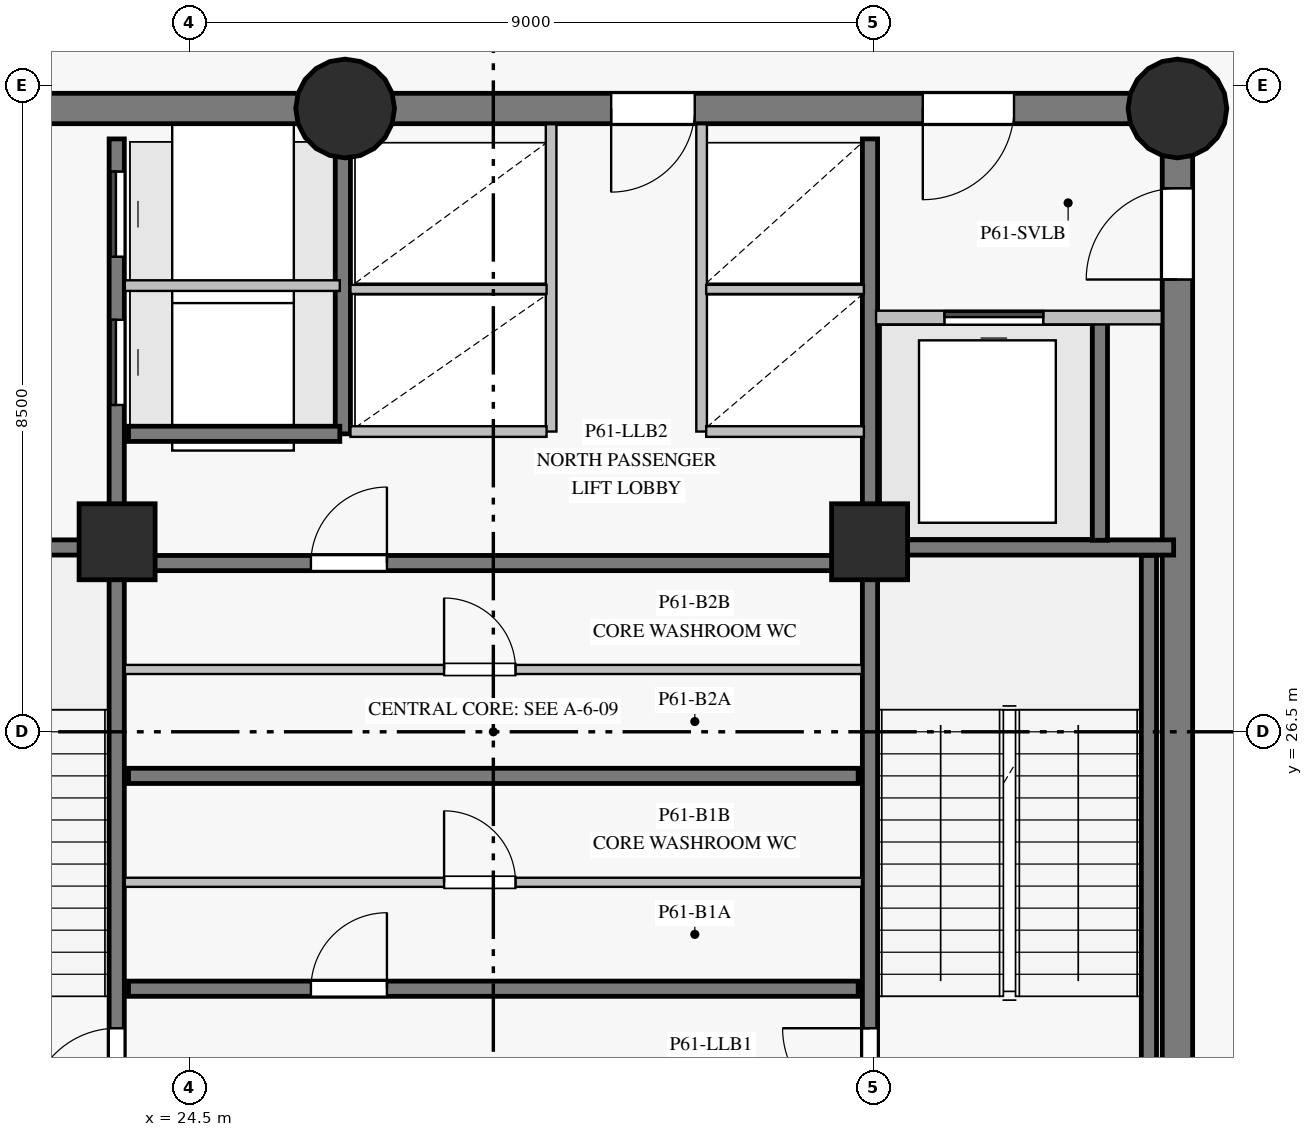
"""IFC4 building model, lengths in metres.
Left out: names, types, materials, properties, quantities, classifications, styles, units other than length and angle.
Written with IfcOpenShell. Run it as: python <this file> out.ifc"""

import sys

from ifc_helpers import new_model, si_unit, direction, frame, frame_2d, origin, origin_with_axes, origin_2d, place, context, subcontext, project, spatial, rectangle, circle, extrude, source, transform, mapped, element, fill, save


model = new_model("IFC4")
c1 = context("Model", 3, precision=1e-05, world=origin(), true_north=direction((0.0, 1.0)))
c2 = subcontext(c1, "Body", "Model", "MODEL_VIEW")
j1 = project(units=[si_unit("LENGTHUNIT", "METRE"), si_unit("PLANEANGLEUNIT", "RADIAN")], contexts=[c1])
p1 = place(None, origin())
s1 = spatial("IfcSite", under=j1, at=p1, CompositionType="ELEMENT")
p2 = place(p1, origin())
s2 = spatial("IfcBuilding", under=s1, at=p2, CompositionType="ELEMENT")
p3 = place(p2, frame((0.0, 0.0, 208.4)))
s3 = spatial("IfcBuildingStorey", under=s2, at=p3, CompositionType="ELEMENT", Elevation=208.4)
p4 = place(p3, frame((37.5, 18.3, 0.0), z_axis=(0.0, 0.0, 1.0), x_axis=(0.0, 1.0, 0.0)))
e1 = element("IfcWall", 1, at=p4, inside=s3, PredefinedType="SHEAR", context=c2, shape_type="SweptSolid", body=[
    extrude(rectangle(XDim=16.4, YDim=0.4, at=frame_2d((8.2, 0.0))), origin(), (0.0, 0.0, 1.0), 4.3),
])
p5 = place(p4, frame((14.15, 0.0, 0.0)))
e2 = element("IfcOpeningElement", 2, at=p5, cuts=e1, PredefinedType="OPENING", context=c2, shape_type="SweptSolid", body=[
    extrude(rectangle(XDim=1.2, YDim=2.15, at=frame_2d((0.6, 1.075))), frame((0.0, 0.21, 0.0), z_axis=(0.0, -1.0, 0.0), x_axis=(1.0, 0.0, 0.0)), (0.0, 0.0, 1.0), 0.42),
])
p6 = place(p3, frame((37.5, 34.7, 0.0), z_axis=(0.0, 0.0, 1.0), x_axis=(-1.0, 0.0, 0.0)))
e3 = element("IfcWall", 3, at=p6, inside=s3, PredefinedType="SHEAR", context=c2, shape_type="SweptSolid", body=[
    extrude(rectangle(XDim=10.95, YDim=0.4, at=frame_2d((5.475, 0.0))), origin(), (0.0, 0.0, 1.0), 4.3),
])
p7 = place(p6, frame((2.15, 0.0, 0.0)))
e4 = element("IfcOpeningElement", 4, at=p7, cuts=e3, PredefinedType="OPENING", context=c2, shape_type="SweptSolid", body=[
    extrude(rectangle(XDim=1.2, YDim=2.15, at=frame_2d((0.6, 1.075))), frame((0.0, 0.21, 0.0), z_axis=(0.0, -1.0, 0.0), x_axis=(1.0, 0.0, 0.0)), (0.0, 0.0, 1.0), 0.42),
])
p8 = place(p6, frame((6.35, 0.0, 0.0)))
e5 = element("IfcOpeningElement", 5, at=p8, cuts=e3, PredefinedType="OPENING", context=c2, shape_type="SweptSolid", body=[
    extrude(rectangle(XDim=1.1, YDim=2.15, at=frame_2d((0.55, 1.075))), frame((0.0, 0.21, 0.0), z_axis=(0.0, -1.0, 0.0), x_axis=(1.0, 0.0, 0.0)), (0.0, 0.0, 1.0), 0.42),
])
p9 = place(p3, frame((26.55, 34.7, 0.0), z_axis=(0.0, 0.0, 1.0), x_axis=(-1.0, 0.0, 0.0)))
e6 = element("IfcWall", 6, at=p9, inside=s3, PredefinedType="SHEAR", context=c2, shape_type="SweptSolid", body=[
    extrude(rectangle(XDim=7.05, YDim=0.4, at=frame_2d((3.525, 0.0))), origin(), (0.0, 0.0, 1.0), 4.3),
])
p10 = place(p9, frame((4.25, 0.0, 0.0)))
e7 = element("IfcOpeningElement", 7, at=p10, cuts=e6, PredefinedType="OPENING", context=c2, shape_type="SweptSolid", body=[
    extrude(rectangle(XDim=1.1, YDim=2.15, at=frame_2d((0.55, 1.075))), frame((0.0, 0.21, 0.0), z_axis=(0.0, -1.0, 0.0), x_axis=(1.0, 0.0, 0.0)), (0.0, 0.0, 1.0), 0.42),
])
m1 = source(origin_with_axes(), c2, "Body", "SweptSolid", [
    extrude(circle(Radius=0.65, at=origin_2d()), origin(), (0.0, 0.0, 1.0), 4.5),
])
for number, where, z_axis, x_axis in (
    (8, (26.55, 34.7, 0.0), (0.0, 0.0, 1.0), (1.0, 0.0, 0.0)),
    (9, (37.5, 34.7, 0.0), (0.0, 0.0, 1.0), (1.0, 0.0, 0.0)),
):
    element("IfcColumn", number, at=place(p3, frame(where, z_axis=z_axis, x_axis=x_axis)), inside=s3, PredefinedType="COLUMN", context=c2, shape_type="MappedRepresentation", body=[
        mapped(m1, transform((0.0, 0.0, 0.0), scale=1.0)),
    ])
m2 = source(origin_with_axes(), c2, "Body", "SweptSolid", [
    extrude(rectangle(XDim=1.0, YDim=1.0, at=origin_2d()), origin(), (0.0, 0.0, 1.0), 4.5),
])
for number, where, z_axis, x_axis in (
    (10, (23.55, 29.0, 0.0), (0.0, 0.0, 1.0), (1.0, 0.0, 0.0)),
    (11, (33.45, 29.0, 0.0), (0.0, 0.0, 1.0), (1.0, 0.0, 0.0)),
):
    element("IfcColumn", number, at=place(p3, frame(where, z_axis=z_axis, x_axis=x_axis)), inside=s3, PredefinedType="COLUMN", context=c2, shape_type="MappedRepresentation", body=[
        mapped(m2, transform((0.0, 0.0, 0.0), scale=1.0)),
    ])
p11 = place(p3, frame((23.545, 18.7, 0.0), z_axis=(0.0, 0.0, 1.0), x_axis=(0.0, 1.0, 0.0)))
e12 = element("IfcWall", 12, at=p11, inside=s3, PredefinedType="SHEAR", context=c2, shape_type="SweptSolid", body=[
    extrude(rectangle(XDim=15.6, YDim=0.2, at=frame_2d((7.8, 0.0))), origin(), (0.0, 0.0, 1.0), 4.3),
])
p12 = place(p11, frame((2.75, 0.0, 0.0)))
e13 = element("IfcOpeningElement", 13, at=p12, cuts=e12, PredefinedType="OPENING", context=c2, shape_type="SweptSolid", body=[
    extrude(rectangle(XDim=1.15, YDim=2.15, at=frame_2d((0.575, 1.075))), frame((0.0, 0.11, 0.0), z_axis=(0.0, -1.0, 0.0), x_axis=(1.0, 0.0, 0.0)), (0.0, 0.0, 1.0), 0.22),
])
p13 = place(p11, frame((0.14, 0.0, 0.0)))
e14 = element("IfcOpeningElement", 14, at=p13, cuts=e12, PredefinedType="OPENING", context=c2, shape_type="SweptSolid", body=[
    extrude(rectangle(XDim=0.88, YDim=2.1, at=frame_2d((0.44, 1.05))), frame((0.0, 0.11, 0.0), z_axis=(0.0, -1.0, 0.0), x_axis=(1.0, 0.0, 0.0)), (0.0, 0.0, 1.0), 0.22),
])
p14 = place(p11, frame((1.36, 0.0, 0.0)))
e15 = element("IfcOpeningElement", 15, at=p14, cuts=e12, PredefinedType="OPENING", context=c2, shape_type="SweptSolid", body=[
    extrude(rectangle(XDim=0.88, YDim=2.1, at=frame_2d((0.44, 1.05))), frame((0.0, 0.11, 0.0), z_axis=(0.0, -1.0, 0.0), x_axis=(1.0, 0.0, 0.0)), (0.0, 0.0, 1.0), 0.22),
])
p15 = place(p11, frame((12.1, 0.0, 0.0)))
e16 = element("IfcOpeningElement", 16, at=p15, cuts=e12, PredefinedType="OPENING", context=c2, shape_type="SweptSolid", body=[
    extrude(rectangle(XDim=1.12, YDim=2.15, at=frame_2d((0.56, 1.075))), frame((0.0, 0.11, 0.0), z_axis=(0.0, -1.0, 0.0), x_axis=(1.0, 0.0, 0.0)), (0.0, 0.0, 1.0), 0.22),
])
p16 = place(p11, frame((14.05, 0.0, 0.0)))
e17 = element("IfcOpeningElement", 17, at=p16, cuts=e12, PredefinedType="OPENING", context=c2, shape_type="SweptSolid", body=[
    extrude(rectangle(XDim=1.12, YDim=2.15, at=frame_2d((0.56, 1.075))), frame((0.0, 0.11, 0.0), z_axis=(0.0, -1.0, 0.0), x_axis=(1.0, 0.0, 0.0)), (0.0, 0.0, 1.0), 0.22),
])
p17 = place(p3, frame((33.455, 18.7, 0.0), z_axis=(0.0, 0.0, 1.0), x_axis=(0.0, 1.0, 0.0)))
e18 = element("IfcWall", 18, at=p17, inside=s3, PredefinedType="SHEAR", context=c2, shape_type="SweptSolid", body=[
    extrude(rectangle(XDim=15.6, YDim=0.2, at=frame_2d((7.8, 0.0))), origin(), (0.0, 0.0, 1.0), 4.3),
])
p18 = place(p17, frame((2.75, 0.0, 0.0)))
e19 = element("IfcOpeningElement", 19, at=p18, cuts=e18, PredefinedType="OPENING", context=c2, shape_type="SweptSolid", body=[
    extrude(rectangle(XDim=1.15, YDim=2.15, at=frame_2d((0.575, 1.075))), frame((0.0, 0.11, 0.0), z_axis=(0.0, -1.0, 0.0), x_axis=(1.0, 0.0, 0.0)), (0.0, 0.0, 1.0), 0.22),
])
p19 = place(p17, frame((0.55, 0.0, 0.0)))
e20 = element("IfcOpeningElement", 20, at=p19, cuts=e18, PredefinedType="OPENING", context=c2, shape_type="SweptSolid", body=[
    extrude(rectangle(XDim=0.94, YDim=2.1, at=frame_2d((0.47, 1.05))), frame((0.0, 0.11, 0.0), z_axis=(0.0, -1.0, 0.0), x_axis=(1.0, 0.0, 0.0)), (0.0, 0.0, 1.0), 0.22),
])
p20 = place(p3, frame((23.7, 23.12, 0.0), z_axis=(0.0, 0.0, 1.0), x_axis=(1.0, 0.0, 0.0)))
e21 = element("IfcWall", 21, at=p20, inside=s3, PredefinedType="SHEAR", context=c2, shape_type="SweptSolid", body=[
    extrude(rectangle(XDim=9.6, YDim=0.2, at=frame_2d((4.8, 0.0))), origin(), (0.0, 0.0, 1.0), 4.3),
])
p21 = place(p20, frame((2.4, 0.0, 0.0)))
e22 = element("IfcOpeningElement", 22, at=p21, cuts=e21, PredefinedType="OPENING", context=c2, shape_type="SweptSolid", body=[
    extrude(rectangle(XDim=1.0, YDim=2.15, at=frame_2d((0.5, 1.075))), frame((0.0, 0.11, 0.0), z_axis=(0.0, -1.0, 0.0), x_axis=(1.0, 0.0, 0.0)), (0.0, 0.0, 1.0), 0.22),
])
p22 = place(p3, frame((23.7, 25.92, 0.0), z_axis=(0.0, 0.0, 1.0), x_axis=(1.0, 0.0, 0.0)))
e23 = element("IfcWall", 23, at=p22, inside=s3, PredefinedType="SHEAR", context=c2, shape_type="SweptSolid", body=[
    extrude(rectangle(XDim=9.6, YDim=0.2, at=frame_2d((4.8, 0.0))), origin(), (0.0, 0.0, 1.0), 4.3),
])
p23 = place(p3, frame((23.7, 28.72, 0.0), z_axis=(0.0, 0.0, 1.0), x_axis=(1.0, 0.0, 0.0)))
e24 = element("IfcWall", 24, at=p23, inside=s3, PredefinedType="SHEAR", context=c2, shape_type="SweptSolid", body=[
    extrude(rectangle(XDim=9.6, YDim=0.2, at=frame_2d((4.8, 0.0))), origin(), (0.0, 0.0, 1.0), 4.3),
])
p24 = place(p23, frame((2.4, 0.0, 0.0)))
e25 = element("IfcOpeningElement", 25, at=p24, cuts=e24, PredefinedType="OPENING", context=c2, shape_type="SweptSolid", body=[
    extrude(rectangle(XDim=1.0, YDim=2.15, at=frame_2d((0.5, 1.075))), frame((0.0, 0.11, 0.0), z_axis=(0.0, -1.0, 0.0), x_axis=(1.0, 0.0, 0.0)), (0.0, 0.0, 1.0), 0.22),
])
p25 = place(p3, frame((37.125, 21.32, 0.0), z_axis=(0.0, 0.0, 1.0), x_axis=(0.0, 1.0, 0.0)))
e26 = element("IfcWall", 26, at=p25, inside=s3, PredefinedType="SHEAR", context=c2, shape_type="SweptSolid", body=[
    extrude(rectangle(XDim=7.5, YDim=0.2, at=frame_2d((3.75, 0.0))), origin(), (0.0, 0.0, 1.0), 4.3),
])
for number, where, z_axis, x_axis in (
    (27, (33.455, 28.925, 0.0), (0.0, 0.0, 1.0), (1.0, 0.0, 0.0)),
    (28, (19.55, 28.925, 0.0), (0.0, 0.0, 1.0), (1.0, 0.0, 0.0)),
):
    element("IfcWall", number, at=place(p3, frame(where, z_axis=z_axis, x_axis=x_axis)), inside=s3, PredefinedType="SHEAR", context=c2, shape_type="SweptSolid", body=[
        extrude(rectangle(XDim=3.995, YDim=0.2, at=frame_2d((1.998, 0.0))), origin(), (0.0, 0.0, 1.0), 4.3),
    ])
p26 = place(p3, frame((26.52, 30.42, 0.0), z_axis=(0.0, 0.0, 1.0), x_axis=(0.0, 1.0, 0.0)))
e29 = element("IfcWall", 29, at=p26, inside=s3, PredefinedType="SHEAR", context=c2, shape_type="SweptSolid", body=[
    extrude(rectangle(XDim=3.86, YDim=0.2, at=frame_2d((1.93, 0.0))), origin(), (0.0, 0.0, 1.0), 4.3),
])
p27 = place(p3, frame((36.48, 29.02, 0.0), z_axis=(0.0, 0.0, 1.0), x_axis=(0.0, 1.0, 0.0)))
e30 = element("IfcWall", 30, at=p27, inside=s3, PredefinedType="SHEAR", context=c2, shape_type="SweptSolid", body=[
    extrude(rectangle(XDim=2.86, YDim=0.2, at=frame_2d((1.43, 0.0))), origin(), (0.0, 0.0, 1.0), 4.3),
])
p28 = place(p3, frame((23.7, 30.42, 0.0), z_axis=(0.0, 0.0, 1.0), x_axis=(1.0, 0.0, 0.0)))
e31 = element("IfcWall", 31, at=p28, inside=s3, PredefinedType="SHEAR", context=c2, shape_type="SweptSolid", body=[
    extrude(rectangle(XDim=2.78, YDim=0.2, at=frame_2d((1.39, 0.0))), origin(), (0.0, 0.0, 1.0), 4.3),
])
p29 = place(p3, frame((23.652, 24.52, 0.0), z_axis=(0.0, 0.0, 1.0), x_axis=(1.0, 0.0, 0.0)))
e32 = element("IfcWall", 32, at=p29, inside=s3, PredefinedType="PARTITIONING", context=c2, shape_type="SweptSolid", body=[
    extrude(rectangle(XDim=9.698, YDim=0.12, at=frame_2d((4.849, 0.0))), origin(), (0.0, 0.0, 1.0), 4.3),
])
p30 = place(p29, frame((4.2, 0.0, 0.0)))
e33 = element("IfcOpeningElement", 33, at=p30, cuts=e32, PredefinedType="OPENING", context=c2, shape_type="SweptSolid", body=[
    extrude(rectangle(XDim=0.94, YDim=2.1, at=frame_2d((0.47, 1.05))), frame((0.0, 0.07, 0.0), z_axis=(0.0, -1.0, 0.0), x_axis=(1.0, 0.0, 0.0)), (0.0, 0.0, 1.0), 0.14),
])
p31 = place(p3, frame((23.652, 27.32, 0.0), z_axis=(0.0, 0.0, 1.0), x_axis=(1.0, 0.0, 0.0)))
e34 = element("IfcWall", 34, at=p31, inside=s3, PredefinedType="PARTITIONING", context=c2, shape_type="SweptSolid", body=[
    extrude(rectangle(XDim=9.698, YDim=0.12, at=frame_2d((4.849, 0.0))), origin(), (0.0, 0.0, 1.0), 4.3),
])
p32 = place(p31, frame((4.2, 0.0, 0.0)))
e35 = element("IfcOpeningElement", 35, at=p32, cuts=e34, PredefinedType="OPENING", context=c2, shape_type="SweptSolid", body=[
    extrude(rectangle(XDim=0.94, YDim=2.1, at=frame_2d((0.47, 1.05))), frame((0.0, 0.07, 0.0), z_axis=(0.0, -1.0, 0.0), x_axis=(1.0, 0.0, 0.0)), (0.0, 0.0, 1.0), 0.14),
])
for number, where, z_axis, x_axis in (
    (36, (29.26, 30.45, 0.0), (0.0, 0.0, 1.0), (0.0, 1.0, 0.0)),
    (37, (31.24, 30.45, 0.0), (0.0, 0.0, 1.0), (0.0, 1.0, 0.0)),
):
    element("IfcWall", number, at=place(p3, frame(where, z_axis=z_axis, x_axis=x_axis)), inside=s3, PredefinedType="PARTITIONING", context=c2, shape_type="SweptSolid", body=[
        extrude(rectangle(XDim=4.043, YDim=0.14, at=frame_2d((2.021, 0.0))), origin(), (0.0, 0.0, 1.0), 4.3),
    ])
p33 = place(p3, frame((33.535, 31.95, 0.0), z_axis=(0.0, 0.0, 1.0), x_axis=(1.0, 0.0, 0.0)))
e38 = element("IfcWall", 38, at=p33, inside=s3, PredefinedType="PARTITIONING", context=c2, shape_type="SweptSolid", body=[
    extrude(rectangle(XDim=3.759, YDim=0.18, at=frame_2d((1.879, 0.0))), origin(), (0.0, 0.0, 1.0), 4.3),
])
p34 = place(p33, frame((0.9, 0.0, 0.0)))
e39 = element("IfcOpeningElement", 39, at=p34, cuts=e38, PredefinedType="OPENING", context=c2, shape_type="SweptSolid", body=[
    extrude(rectangle(XDim=1.3, YDim=2.2, at=frame_2d((0.65, 1.1))), frame((0.0, 0.1, 0.0), z_axis=(0.0, -1.0, 0.0), x_axis=(1.0, 0.0, 0.0)), (0.0, 0.0, 1.0), 0.2),
])
p35 = place(p3, frame((23.652, 32.37, 0.0), z_axis=(0.0, 0.0, 1.0), x_axis=(1.0, 0.0, 0.0)))
e40 = element("IfcWall", 40, at=p35, inside=s3, PredefinedType="PARTITIONING", context=c2, shape_type="SweptSolid", body=[
    extrude(rectangle(XDim=2.828, YDim=0.14, at=frame_2d((1.414, 0.0))), origin(), (0.0, 0.0, 1.0), 4.3),
])
p36 = place(p3, frame((26.62, 30.45, 0.0), z_axis=(0.0, 0.0, 1.0), x_axis=(1.0, 0.0, 0.0)))
e41 = element("IfcWall", 41, at=p36, inside=s3, PredefinedType="PARTITIONING", context=c2, shape_type="SweptSolid", body=[
    extrude(rectangle(XDim=2.58, YDim=0.14, at=frame_2d((1.29, 0.0))), origin(), (0.0, 0.0, 1.0), 4.3),
])
p37 = place(p3, frame((26.62, 32.32, 0.0), z_axis=(0.0, 0.0, 1.0), x_axis=(1.0, 0.0, 0.0)))
e42 = element("IfcWall", 42, at=p37, inside=s3, PredefinedType="PARTITIONING", context=c2, shape_type="SweptSolid", body=[
    extrude(rectangle(XDim=2.58, YDim=0.12, at=frame_2d((1.29, 0.0))), origin(), (0.0, 0.0, 1.0), 4.3),
])
p38 = place(p3, frame((31.3, 30.45, 0.0), z_axis=(0.0, 0.0, 1.0), x_axis=(1.0, 0.0, 0.0)))
e43 = element("IfcWall", 43, at=p38, inside=s3, PredefinedType="PARTITIONING", context=c2, shape_type="SweptSolid", body=[
    extrude(rectangle(XDim=2.075, YDim=0.14, at=frame_2d((1.038, 0.0))), origin(), (0.0, 0.0, 1.0), 4.3),
])
p39 = place(p3, frame((31.3, 32.32, 0.0), z_axis=(0.0, 0.0, 1.0), x_axis=(1.0, 0.0, 0.0)))
e44 = element("IfcWall", 44, at=p39, inside=s3, PredefinedType="PARTITIONING", context=c2, shape_type="SweptSolid", body=[
    extrude(rectangle(XDim=2.075, YDim=0.12, at=frame_2d((1.038, 0.0))), origin(), (0.0, 0.0, 1.0), 4.3),
])
m3 = source(origin_with_axes(), c2, "Body", "SweptSolid", [
    extrude(rectangle(XDim=1.15, YDim=2.15, at=frame_2d((0.575, 1.075))), frame((0.0, 0.025, 0.0), z_axis=(0.0, -1.0, 0.0), x_axis=(1.0, 0.0, 0.0)), (0.0, 0.0, 1.0), 0.05),
])
p40 = place(p12, origin())
e45 = element("IfcDoor", 45, at=p40, inside=s3, OperationType="SINGLE_SWING_LEFT", PredefinedType="DOOR", context=c2, shape_type="MappedRepresentation", body=[
    mapped(m3, transform((0.0, 0.0, 0.0), scale=1.0)),
])
fill(e13, e45)
p41 = place(p18, origin())
e46 = element("IfcDoor", 46, at=p41, inside=s3, OperationType="SINGLE_SWING_RIGHT", PredefinedType="DOOR", context=c2, shape_type="MappedRepresentation", body=[
    mapped(m3, transform((0.0, 0.0, 0.0), scale=1.0)),
])
fill(e19, e46)
m4 = source(origin_with_axes(), c2, "Body", "SweptSolid", [
    extrude(rectangle(XDim=1.2, YDim=2.15, at=frame_2d((0.6, 1.075))), frame((0.0, 0.025, 0.0), z_axis=(0.0, -1.0, 0.0), x_axis=(1.0, 0.0, 0.0)), (0.0, 0.0, 1.0), 0.05),
])
p42 = place(p5, origin())
e47 = element("IfcDoor", 47, at=p42, inside=s3, OperationType="SINGLE_SWING_LEFT", PredefinedType="DOOR", context=c2, shape_type="MappedRepresentation", body=[
    mapped(m4, transform((0.0, 0.0, 0.0), scale=1.0)),
])
fill(e2, e47)
p43 = place(p7, origin())
e48 = element("IfcDoor", 48, at=p43, inside=s3, OperationType="SINGLE_SWING_RIGHT", PredefinedType="DOOR", context=c2, shape_type="MappedRepresentation", body=[
    mapped(m4, transform((0.0, 0.0, 0.0), scale=1.0)),
])
fill(e4, e48)
m5 = source(origin_with_axes(), c2, "Body", "SweptSolid", [
    extrude(rectangle(XDim=1.3, YDim=2.2, at=frame_2d((0.65, 1.1))), frame((0.0, 0.025, 0.0), z_axis=(0.0, -1.0, 0.0), x_axis=(1.0, 0.0, 0.0)), (0.0, 0.0, 1.0), 0.05),
])
p44 = place(p34, origin())
e49 = element("IfcDoor", 49, at=p44, inside=s3, OperationType="SLIDING_TO_LEFT", PredefinedType="DOOR", context=c2, shape_type="MappedRepresentation", body=[
    mapped(m5, transform((0.0, 0.0, 0.0), scale=1.0)),
])
fill(e39, e49)
m6 = source(origin_with_axes(), c2, "Body", "SweptSolid", [
    extrude(rectangle(XDim=1.0, YDim=2.15, at=frame_2d((0.5, 1.075))), frame((0.0, 0.025, 0.0), z_axis=(0.0, -1.0, 0.0), x_axis=(1.0, 0.0, 0.0)), (0.0, 0.0, 1.0), 0.05),
])
p45 = place(p21, origin())
e50 = element("IfcDoor", 50, at=p45, inside=s3, OperationType="SINGLE_SWING_RIGHT", PredefinedType="DOOR", context=c2, shape_type="MappedRepresentation", body=[
    mapped(m6, transform((0.0, 0.0, 0.0), scale=1.0)),
])
fill(e22, e50)
m7 = source(origin_with_axes(), c2, "Body", "SweptSolid", [
    extrude(rectangle(XDim=0.94, YDim=2.1, at=frame_2d((0.47, 1.05))), frame((0.0, 0.025, 0.0), z_axis=(0.0, -1.0, 0.0), x_axis=(1.0, 0.0, 0.0)), (0.0, 0.0, 1.0), 0.05),
])
p46 = place(p30, origin())
e51 = element("IfcDoor", 51, at=p46, inside=s3, OperationType="SINGLE_SWING_LEFT", PredefinedType="DOOR", context=c2, shape_type="MappedRepresentation", body=[
    mapped(m7, transform((0.0, 0.0, 0.0), scale=1.0)),
])
fill(e33, e51)
p47 = place(p24, origin())
e52 = element("IfcDoor", 52, at=p47, inside=s3, OperationType="SINGLE_SWING_RIGHT", PredefinedType="DOOR", context=c2, shape_type="MappedRepresentation", body=[
    mapped(m6, transform((0.0, 0.0, 0.0), scale=1.0)),
])
fill(e25, e52)
p48 = place(p32, origin())
e53 = element("IfcDoor", 53, at=p48, inside=s3, OperationType="SINGLE_SWING_LEFT", PredefinedType="DOOR", context=c2, shape_type="MappedRepresentation", body=[
    mapped(m7, transform((0.0, 0.0, 0.0), scale=1.0)),
])
fill(e35, e53)
m8 = source(origin_with_axes(), c2, "Body", "SweptSolid", [
    extrude(rectangle(XDim=1.1, YDim=2.15, at=frame_2d((0.55, 1.075))), frame((0.0, 0.025, 0.0), z_axis=(0.0, -1.0, 0.0), x_axis=(1.0, 0.0, 0.0)), (0.0, 0.0, 1.0), 0.05),
])
p49 = place(p8, origin())
e54 = element("IfcDoor", 54, at=p49, inside=s3, OperationType="SINGLE_SWING_RIGHT", PredefinedType="DOOR", context=c2, shape_type="MappedRepresentation", body=[
    mapped(m8, transform((0.0, 0.0, 0.0), scale=1.0)),
])
fill(e5, e54)
m9 = source(origin_with_axes(), c2, "Body", "SweptSolid", [
    extrude(rectangle(XDim=1.12, YDim=2.15, at=frame_2d((0.56, 1.075))), frame((0.0, 0.025, 0.0), z_axis=(0.0, -1.0, 0.0), x_axis=(1.0, 0.0, 0.0)), (0.0, 0.0, 1.0), 0.05),
])
p50 = place(p15, origin())
e55 = element("IfcDoor", 55, at=p50, inside=s3, OperationType="SLIDING_TO_LEFT", PredefinedType="DOOR", context=c2, shape_type="MappedRepresentation", body=[
    mapped(m9, transform((0.0, 0.0, 0.0), scale=1.0)),
])
fill(e16, e55)
p51 = place(p16, origin())
e56 = element("IfcDoor", 56, at=p51, inside=s3, OperationType="SLIDING_TO_RIGHT", PredefinedType="DOOR", context=c2, shape_type="MappedRepresentation", body=[
    mapped(m9, transform((0.0, 0.0, 0.0), scale=1.0)),
])
fill(e17, e56)
save(model, sys.argv[1])
